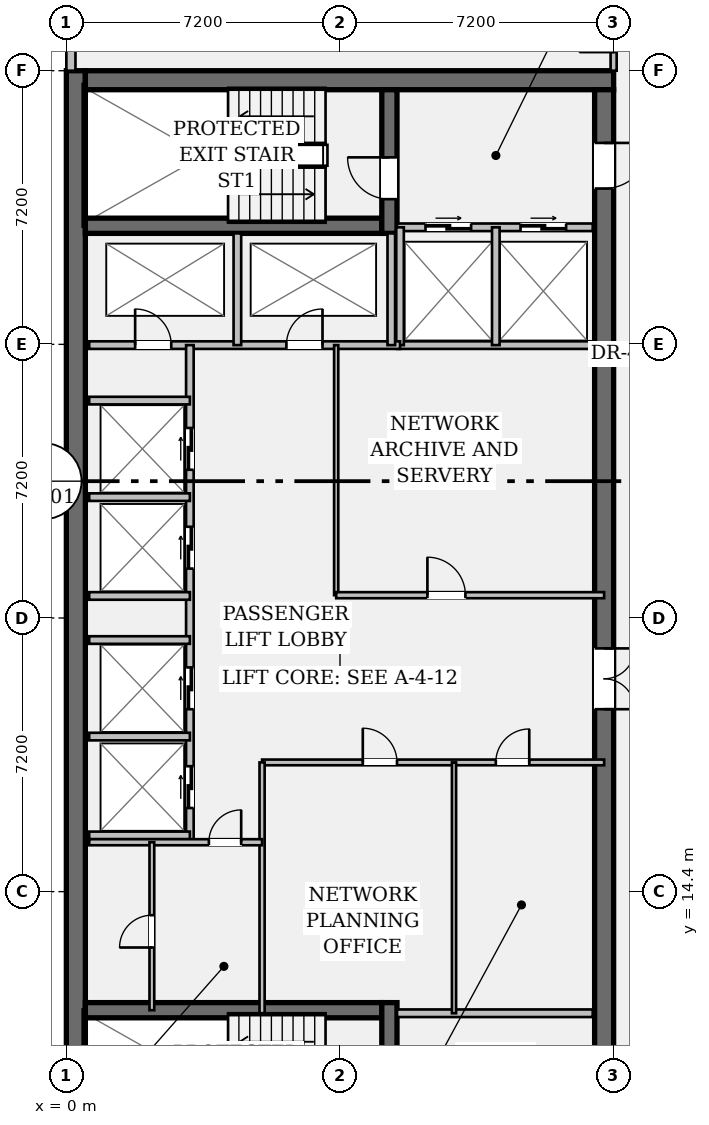
"""IFC4 building model, lengths in metres.
Left out: names, types, materials, properties, quantities, classifications, styles, units other than length and angle.
Written with IfcOpenShell. Run it as: python <this file> out.ifc"""

import sys

from ifc_helpers import new_model, si_unit, direction, frame, frame_2d, origin, place, context, subcontext, project, spatial, rectangle, extrude, element, fill, save


model = new_model("IFC4")
c1 = context("Model", 3, precision=1e-05, world=origin(), true_north=direction((0.0, 1.0)))
c2 = subcontext(c1, "Body", "Model", "MODEL_VIEW")
j1 = project(units=[si_unit("LENGTHUNIT", "METRE"), si_unit("PLANEANGLEUNIT", "RADIAN")], contexts=[c1])
p1 = place(None, origin())
s1 = spatial("IfcSite", under=j1, at=p1, CompositionType="ELEMENT")
p2 = place(p1, origin())
s2 = spatial("IfcBuilding", under=s1, at=p2, CompositionType="ELEMENT")
p3 = place(p2, frame((0.0, 0.0, 183.75)))
s3 = spatial("IfcBuildingStorey", under=s2, at=p3, CompositionType="ELEMENT", Elevation=183.75)
p4 = place(p3, frame((0.25, 7.2, 0.0), z_axis=(0.0, 0.0, 1.0), x_axis=(0.0, 1.0, 0.0)))
e1 = element("IfcWall", 1, at=p4, inside=s3, PredefinedType="SHEAR", context=c2, shape_type="SweptSolid", body=[
    extrude(rectangle(XDim=28.8, YDim=0.5, at=frame_2d((14.4, 0.0))), origin(), (0.0, 0.0, 1.0), 3.24),
])
p5 = place(p3, frame((0.5, 35.75, 0.0), z_axis=(0.0, 0.0, 1.0), x_axis=(1.0, 0.0, 0.0)))
e2 = element("IfcWall", 2, at=p5, inside=s3, PredefinedType="SHEAR", context=c2, shape_type="SweptSolid", body=[
    extrude(rectangle(XDim=13.9, YDim=0.5, at=frame_2d((6.95, 0.0))), origin(), (0.0, 0.0, 1.0), 3.24),
])
p6 = place(p3, frame((14.15, 35.5, 0.0), z_axis=(0.0, 0.0, 1.0), x_axis=(0.0, -1.0, 0.0)))
e3 = element("IfcWall", 3, at=p6, inside=s3, PredefinedType="SHEAR", context=c2, shape_type="SweptSolid", body=[
    extrude(rectangle(XDim=27.8, YDim=0.5, at=frame_2d((13.9, 0.0))), origin(), (0.0, 0.0, 1.0), 3.24),
])
p7 = place(p6, frame((1.4, 0.0, 0.0)))
e4 = element("IfcOpeningElement", 4, at=p7, cuts=e3, PredefinedType="OPENING", context=c2, shape_type="SweptSolid", body=[
    extrude(rectangle(XDim=1.2, YDim=2.15, at=frame_2d((0.6, 1.075))), frame((0.0, 0.262, 0.0), z_axis=(0.0, -1.0, 0.0), x_axis=(1.0, 0.0, 0.0)), (0.0, 0.0, 1.0), 0.524),
])
p8 = place(p6, frame((25.35, 0.0, 0.0)))
e5 = element("IfcOpeningElement", 5, at=p8, cuts=e3, PredefinedType="OPENING", context=c2, shape_type="SweptSolid", body=[
    extrude(rectangle(XDim=1.2, YDim=2.15, at=frame_2d((0.6, 1.075))), frame((0.0, 0.262, 0.0), z_axis=(0.0, -1.0, 0.0), x_axis=(1.0, 0.0, 0.0)), (0.0, 0.0, 1.0), 0.524),
])
p9 = place(p6, frame((14.7, 0.0, 0.0)))
e6 = element("IfcOpeningElement", 6, at=p9, cuts=e3, PredefinedType="OPENING", context=c2, shape_type="SweptSolid", body=[
    extrude(rectangle(XDim=1.6, YDim=2.2, at=frame_2d((0.8, 1.1))), frame((0.0, 0.262, 0.0), z_axis=(0.0, -1.0, 0.0), x_axis=(1.0, 0.0, 0.0)), (0.0, 0.0, 1.0), 0.524),
])
for number, where, z_axis, x_axis in (
    (7, (0.5, 31.92, 0.0), (0.0, 0.0, 1.0), (1.0, 0.0, 0.0)),
    (8, (0.5, 11.28, 0.0), (0.0, 0.0, 1.0), (1.0, 0.0, 0.0)),
):
    element("IfcWall", number, at=place(p3, frame(where, z_axis=z_axis, x_axis=x_axis)), inside=s3, PredefinedType="SHEAR", context=c2, shape_type="SweptSolid", body=[
        extrude(rectangle(XDim=7.8, YDim=0.4, at=frame_2d((3.9, 0.0))), origin(), (0.0, 0.0, 1.0), 3.24),
    ])
p10 = place(p3, frame((8.5, 31.72, 0.0), z_axis=(0.0, 0.0, 1.0), x_axis=(0.0, 1.0, 0.0)))
e9 = element("IfcWall", 9, at=p10, inside=s3, PredefinedType="SHEAR", context=c2, shape_type="SweptSolid", body=[
    extrude(rectangle(XDim=3.78, YDim=0.4, at=frame_2d((1.89, 0.0))), origin(), (0.0, 0.0, 1.0), 3.24),
])
p11 = place(p10, frame((0.9, 0.0, 0.0)))
e10 = element("IfcOpeningElement", 10, at=p11, cuts=e9, PredefinedType="OPENING", context=c2, shape_type="SweptSolid", body=[
    extrude(rectangle(XDim=1.1, YDim=2.15, at=frame_2d((0.55, 1.075))), frame((0.0, 0.212, 0.0), z_axis=(0.0, -1.0, 0.0), x_axis=(1.0, 0.0, 0.0)), (0.0, 0.0, 1.0), 0.424),
])
p12 = place(p3, frame((8.5, 7.7, 0.0), z_axis=(0.0, 0.0, 1.0), x_axis=(0.0, 1.0, 0.0)))
e11 = element("IfcWall", 11, at=p12, inside=s3, PredefinedType="SHEAR", context=c2, shape_type="SweptSolid", body=[
    extrude(rectangle(XDim=3.78, YDim=0.4, at=frame_2d((1.89, 0.0))), origin(), (0.0, 0.0, 1.0), 3.24),
])
p13 = place(p12, frame((0.85, 0.0, 0.0)))
e12 = element("IfcOpeningElement", 12, at=p13, cuts=e11, PredefinedType="OPENING", context=c2, shape_type="SweptSolid", body=[
    extrude(rectangle(XDim=1.1, YDim=2.15, at=frame_2d((0.55, 1.075))), frame((0.0, 0.212, 0.0), z_axis=(0.0, -1.0, 0.0), x_axis=(1.0, 0.0, 0.0)), (0.0, 0.0, 1.0), 0.424),
])
p14 = place(p3, frame((0.12, 36.0, 0.0), z_axis=(0.0, 0.0, 1.0), x_axis=(0.0, 1.0, 0.0)))
e13 = element("IfcWall", 13, at=p14, inside=s3, PredefinedType="STANDARD", context=c2, shape_type="SweptSolid", body=[
    extrude(rectangle(XDim=1.13, YDim=0.24, at=frame_2d((0.565, 0.0))), origin(), (0.0, 0.0, 1.0), 3.24),
])
p15 = place(p3, frame((8.7, 31.88, 0.0), z_axis=(0.0, 0.0, 1.0), x_axis=(1.0, 0.0, 0.0)))
e14 = element("IfcWall", 14, at=p15, inside=s3, PredefinedType="PARTITIONING", context=c2, shape_type="SweptSolid", body=[
    extrude(rectangle(XDim=5.15, YDim=0.2, at=frame_2d((2.575, 0.0))), origin(), (0.0, 0.0, 1.0), 3.24),
])
p16 = place(p15, frame((0.75, 0.0, 0.0)))
e15 = element("IfcOpeningElement", 15, at=p16, cuts=e14, PredefinedType="OPENING", context=c2, shape_type="SweptSolid", body=[
    extrude(rectangle(XDim=1.2, YDim=2.2, at=frame_2d((0.6, 1.1))), frame((0.0, 0.112, 0.0), z_axis=(0.0, -1.0, 0.0), x_axis=(1.0, 0.0, 0.0)), (0.0, 0.0, 1.0), 0.224),
])
p17 = place(p15, frame((3.25, 0.0, 0.0)))
e16 = element("IfcOpeningElement", 16, at=p17, cuts=e14, PredefinedType="OPENING", context=c2, shape_type="SweptSolid", body=[
    extrude(rectangle(XDim=1.2, YDim=2.2, at=frame_2d((0.6, 1.1))), frame((0.0, 0.112, 0.0), z_axis=(0.0, -1.0, 0.0), x_axis=(1.0, 0.0, 0.0)), (0.0, 0.0, 1.0), 0.224),
])
for number, where, z_axis, x_axis in (
    (17, (8.7, 11.2, 0.0), (0.0, 0.0, 1.0), (1.0, 0.0, 0.0)),
    (18, (8.7, 28.78, 0.0), (0.0, 0.0, 1.0), (1.0, 0.0, 0.0)),
):
    element("IfcWall", number, at=place(p3, frame(where, z_axis=z_axis, x_axis=x_axis)), inside=s3, PredefinedType="PARTITIONING", context=c2, shape_type="SweptSolid", body=[
        extrude(rectangle(XDim=5.15, YDim=0.2, at=frame_2d((2.575, 0.0))), origin(), (0.0, 0.0, 1.0), 3.24),
    ])
for number, where, z_axis, x_axis in (
    (19, (8.78, 28.78, 0.0), (0.0, 0.0, 1.0), (0.0, 1.0, 0.0)),
    (20, (11.3, 28.78, 0.0), (0.0, 0.0, 1.0), (0.0, 1.0, 0.0)),
):
    element("IfcWall", number, at=place(p3, frame(where, z_axis=z_axis, x_axis=x_axis)), inside=s3, PredefinedType="PARTITIONING", context=c2, shape_type="SweptSolid", body=[
        extrude(rectangle(XDim=3.1, YDim=0.2, at=frame_2d((1.55, 0.0))), origin(), (0.0, 0.0, 1.0), 3.24),
    ])
p18 = place(p3, frame((0.6, 28.78, 0.0), z_axis=(0.0, 0.0, 1.0), x_axis=(1.0, 0.0, 0.0)))
e21 = element("IfcWall", 21, at=p18, inside=s3, PredefinedType="PARTITIONING", context=c2, shape_type="SweptSolid", body=[
    extrude(rectangle(XDim=8.18, YDim=0.2, at=frame_2d((4.09, 0.0))), origin(), (0.0, 0.0, 1.0), 3.24),
])
p19 = place(p18, frame((1.21, 0.0, 0.0)))
e22 = element("IfcOpeningElement", 22, at=p19, cuts=e21, PredefinedType="OPENING", context=c2, shape_type="SweptSolid", body=[
    extrude(rectangle(XDim=0.95, YDim=2.15, at=frame_2d((0.475, 1.075))), frame((0.0, 0.112, 0.0), z_axis=(0.0, -1.0, 0.0), x_axis=(1.0, 0.0, 0.0)), (0.0, 0.0, 1.0), 0.224),
])
p20 = place(p18, frame((5.19, 0.0, 0.0)))
e23 = element("IfcOpeningElement", 23, at=p20, cuts=e21, PredefinedType="OPENING", context=c2, shape_type="SweptSolid", body=[
    extrude(rectangle(XDim=0.95, YDim=2.15, at=frame_2d((0.475, 1.075))), frame((0.0, 0.112, 0.0), z_axis=(0.0, -1.0, 0.0), x_axis=(1.0, 0.0, 0.0)), (0.0, 0.0, 1.0), 0.224),
])
for number, where, z_axis, x_axis in (
    (24, (4.5, 28.78, 0.0), (0.0, 0.0, 1.0), (0.0, 1.0, 0.0)),
    (25, (8.55, 28.78, 0.0), (0.0, 0.0, 1.0), (0.0, 1.0, 0.0)),
):
    element("IfcWall", number, at=place(p3, frame(where, z_axis=z_axis, x_axis=x_axis)), inside=s3, PredefinedType="PARTITIONING", context=c2, shape_type="SweptSolid", body=[
        extrude(rectangle(XDim=2.94, YDim=0.2, at=frame_2d((1.47, 0.0))), origin(), (0.0, 0.0, 1.0), 3.24),
    ])
p21 = place(p3, frame((3.25, 15.7, 0.0), z_axis=(0.0, 0.0, 1.0), x_axis=(0.0, 1.0, 0.0)))
e26 = element("IfcWall", 26, at=p21, inside=s3, PredefinedType="PARTITIONING", context=c2, shape_type="SweptSolid", body=[
    extrude(rectangle(XDim=13.08, YDim=0.2, at=frame_2d((6.54, 0.0))), origin(), (0.0, 0.0, 1.0), 3.24),
])
p22 = place(p21, frame((0.9, 0.0, 0.0)))
e27 = element("IfcOpeningElement", 27, at=p22, cuts=e26, PredefinedType="OPENING", context=c2, shape_type="SweptSolid", body=[
    extrude(rectangle(XDim=1.1, YDim=2.2, at=frame_2d((0.55, 1.1))), frame((0.0, 0.112, 0.0), z_axis=(0.0, -1.0, 0.0), x_axis=(1.0, 0.0, 0.0)), (0.0, 0.0, 1.0), 0.224),
])
p23 = place(p21, frame((3.5, 0.0, 0.0)))
e28 = element("IfcOpeningElement", 28, at=p23, cuts=e26, PredefinedType="OPENING", context=c2, shape_type="SweptSolid", body=[
    extrude(rectangle(XDim=1.1, YDim=2.2, at=frame_2d((0.55, 1.1))), frame((0.0, 0.112, 0.0), z_axis=(0.0, -1.0, 0.0), x_axis=(1.0, 0.0, 0.0)), (0.0, 0.0, 1.0), 0.224),
])
p24 = place(p21, frame((7.2, 0.0, 0.0)))
e29 = element("IfcOpeningElement", 29, at=p24, cuts=e26, PredefinedType="OPENING", context=c2, shape_type="SweptSolid", body=[
    extrude(rectangle(XDim=1.1, YDim=2.2, at=frame_2d((0.55, 1.1))), frame((0.0, 0.112, 0.0), z_axis=(0.0, -1.0, 0.0), x_axis=(1.0, 0.0, 0.0)), (0.0, 0.0, 1.0), 0.224),
])
p25 = place(p21, frame((9.8, 0.0, 0.0)))
e30 = element("IfcOpeningElement", 30, at=p25, cuts=e26, PredefinedType="OPENING", context=c2, shape_type="SweptSolid", body=[
    extrude(rectangle(XDim=1.1, YDim=2.2, at=frame_2d((0.55, 1.1))), frame((0.0, 0.112, 0.0), z_axis=(0.0, -1.0, 0.0), x_axis=(1.0, 0.0, 0.0)), (0.0, 0.0, 1.0), 0.224),
])
for number, where, z_axis, x_axis in (
    (31, (0.6, 15.88, 0.0), (0.0, 0.0, 1.0), (1.0, 0.0, 0.0)),
    (32, (0.6, 18.48, 0.0), (0.0, 0.0, 1.0), (1.0, 0.0, 0.0)),
    (33, (0.6, 22.18, 0.0), (0.0, 0.0, 1.0), (1.0, 0.0, 0.0)),
    (34, (0.6, 24.78, 0.0), (0.0, 0.0, 1.0), (1.0, 0.0, 0.0)),
    (35, (0.6, 21.02, 0.0), (0.0, 0.0, 1.0), (1.0, 0.0, 0.0)),
    (36, (0.6, 27.32, 0.0), (0.0, 0.0, 1.0), (1.0, 0.0, 0.0)),
):
    element("IfcWall", number, at=place(p3, frame(where, z_axis=z_axis, x_axis=x_axis)), inside=s3, PredefinedType="PARTITIONING", context=c2, shape_type="SweptSolid", body=[
        extrude(rectangle(XDim=2.65, YDim=0.2, at=frame_2d((1.325, 0.0))), origin(), (0.0, 0.0, 1.0), 3.24),
    ])
p26 = place(p3, frame((7.1, 22.2, 0.0), z_axis=(0.0, 0.0, 1.0), x_axis=(0.0, 1.0, 0.0)))
e37 = element("IfcWall", 37, at=p26, inside=s3, PredefinedType="PARTITIONING", context=c2, shape_type="SweptSolid", body=[
    extrude(rectangle(XDim=6.58, YDim=0.11, at=frame_2d((3.29, 0.0))), origin(), (0.0, 0.0, 1.0), 3.24),
])
p27 = place(p3, frame((7.1, 22.2, 0.0), z_axis=(0.0, 0.0, 1.0), x_axis=(1.0, 0.0, 0.0)))
e38 = element("IfcWall", 38, at=p27, inside=s3, PredefinedType="PARTITIONING", context=c2, shape_type="SweptSolid", body=[
    extrude(rectangle(XDim=7.05, YDim=0.16, at=frame_2d((3.525, 0.0))), origin(), (0.0, 0.0, 1.0), 3.24),
])
p28 = place(p27, frame((2.4, 0.0, 0.0)))
e39 = element("IfcOpeningElement", 39, at=p28, cuts=e38, PredefinedType="OPENING", context=c2, shape_type="SweptSolid", body=[
    extrude(rectangle(XDim=1.0, YDim=2.15, at=frame_2d((0.5, 1.075))), frame((0.0, 0.092, 0.0), z_axis=(0.0, -1.0, 0.0), x_axis=(1.0, 0.0, 0.0)), (0.0, 0.0, 1.0), 0.184),
])
p29 = place(p3, frame((5.15, 17.8, 0.0), z_axis=(0.0, 0.0, 1.0), x_axis=(1.0, 0.0, 0.0)))
e40 = element("IfcWall", 40, at=p29, inside=s3, PredefinedType="PARTITIONING", context=c2, shape_type="SweptSolid", body=[
    extrude(rectangle(XDim=9.0, YDim=0.15, at=frame_2d((4.5, 0.0))), origin(), (0.0, 0.0, 1.0), 3.24),
])
p30 = place(p29, frame((2.65, 0.0, 0.0)))
e41 = element("IfcOpeningElement", 41, at=p30, cuts=e40, PredefinedType="OPENING", context=c2, shape_type="SweptSolid", body=[
    extrude(rectangle(XDim=0.9, YDim=2.15, at=frame_2d((0.45, 1.075))), frame((0.0, 0.087, 0.0), z_axis=(0.0, -1.0, 0.0), x_axis=(1.0, 0.0, 0.0)), (0.0, 0.0, 1.0), 0.174),
])
p31 = place(p29, frame((6.15, 0.0, 0.0)))
e42 = element("IfcOpeningElement", 42, at=p31, cuts=e40, PredefinedType="OPENING", context=c2, shape_type="SweptSolid", body=[
    extrude(rectangle(XDim=0.88, YDim=2.15, at=frame_2d((0.44, 1.075))), frame((0.0, 0.087, 0.0), z_axis=(0.0, -1.0, 0.0), x_axis=(1.0, 0.0, 0.0)), (0.0, 0.0, 1.0), 0.174),
])
p32 = place(p3, frame((5.15, 11.2, 0.0), z_axis=(0.0, 0.0, 1.0), x_axis=(0.0, 1.0, 0.0)))
e43 = element("IfcWall", 43, at=p32, inside=s3, PredefinedType="PARTITIONING", context=c2, shape_type="SweptSolid", body=[
    extrude(rectangle(XDim=6.6, YDim=0.135, at=frame_2d((3.3, 0.0))), origin(), (0.0, 0.0, 1.0), 3.24),
])
p33 = place(p3, frame((10.2, 11.2, 0.0), z_axis=(0.0, 0.0, 1.0), x_axis=(0.0, 1.0, 0.0)))
e44 = element("IfcWall", 44, at=p33, inside=s3, PredefinedType="PARTITIONING", context=c2, shape_type="SweptSolid", body=[
    extrude(rectangle(XDim=6.6, YDim=0.11, at=frame_2d((3.3, 0.0))), origin(), (0.0, 0.0, 1.0), 3.24),
])
p34 = place(p3, frame((0.6, 15.7, 0.0), z_axis=(0.0, 0.0, 1.0), x_axis=(1.0, 0.0, 0.0)))
e45 = element("IfcWall", 45, at=p34, inside=s3, PredefinedType="PARTITIONING", context=c2, shape_type="SweptSolid", body=[
    extrude(rectangle(XDim=4.55, YDim=0.16, at=frame_2d((2.275, 0.0))), origin(), (0.0, 0.0, 1.0), 3.24),
])
p35 = place(p34, frame((3.15, 0.0, 0.0)))
e46 = element("IfcOpeningElement", 46, at=p35, cuts=e45, PredefinedType="OPENING", context=c2, shape_type="SweptSolid", body=[
    extrude(rectangle(XDim=0.85, YDim=2.15, at=frame_2d((0.425, 1.075))), frame((0.0, 0.092, 0.0), z_axis=(0.0, -1.0, 0.0), x_axis=(1.0, 0.0, 0.0)), (0.0, 0.0, 1.0), 0.184),
])
p36 = place(p3, frame((2.25, 11.28, 0.0), z_axis=(0.0, 0.0, 1.0), x_axis=(0.0, 1.0, 0.0)))
e47 = element("IfcWall", 47, at=p36, inside=s3, PredefinedType="PARTITIONING", context=c2, shape_type="SweptSolid", body=[
    extrude(rectangle(XDim=4.42, YDim=0.125, at=frame_2d((2.21, 0.0))), origin(), (0.0, 0.0, 1.0), 3.24),
])
p37 = place(p36, frame((1.65, 0.0, 0.0)))
e48 = element("IfcOpeningElement", 48, at=p37, cuts=e47, PredefinedType="OPENING", context=c2, shape_type="SweptSolid", body=[
    extrude(rectangle(XDim=0.85, YDim=2.15, at=frame_2d((0.425, 1.075))), frame((0.0, 0.074, 0.0), z_axis=(0.0, -1.0, 0.0), x_axis=(1.0, 0.0, 0.0)), (0.0, 0.0, 1.0), 0.149),
])
p38 = place(p3, frame((14.4, 36.0, 0.0), z_axis=(0.0, 0.0, 1.0), x_axis=(0.0, 1.0, 0.0)))
e49 = element("IfcWall", 49, at=p38, inside=s3, PredefinedType="PARTITIONING", context=c2, shape_type="SweptSolid", body=[
    extrude(rectangle(XDim=3.88, YDim=0.16, at=frame_2d((1.94, 0.0))), origin(), (0.0, 0.0, 1.0), 2.603),
])
p39 = place(p38, frame((0.49, 0.0, 0.0)))
e50 = element("IfcOpeningElement", 50, at=p39, cuts=e49, PredefinedType="OPENING", context=c2, shape_type="SweptSolid", body=[
    extrude(rectangle(XDim=0.9, YDim=2.15, at=frame_2d((0.45, 1.075))), frame((0.0, 0.092, 0.0), z_axis=(0.0, -1.0, 0.0), x_axis=(1.0, 0.0, 0.0)), (0.0, 0.0, 1.0), 0.184),
])
p40 = place(p11, origin())
e51 = element("IfcDoor", 51, at=p40, inside=s3, OperationType="SINGLE_SWING_RIGHT", PredefinedType="DOOR", context=c2, shape_type="SweptSolid", body=[
    extrude(rectangle(XDim=1.1, YDim=2.15, at=frame_2d((0.55, 1.075))), frame((0.0, 0.025, 0.0), z_axis=(0.0, -1.0, 0.0), x_axis=(1.0, 0.0, 0.0)), (0.0, 0.0, 1.0), 0.05),
])
fill(e10, e51)
p41 = place(p7, origin())
e52 = element("IfcDoor", 52, at=p41, inside=s3, OperationType="SINGLE_SWING_LEFT", PredefinedType="DOOR", context=c2, shape_type="SweptSolid", body=[
    extrude(rectangle(XDim=1.2, YDim=2.15, at=frame_2d((0.6, 1.075))), frame((0.0, 0.025, 0.0), z_axis=(0.0, -1.0, 0.0), x_axis=(1.0, 0.0, 0.0)), (0.0, 0.0, 1.0), 0.05),
])
fill(e4, e52)
p42 = place(p16, origin())
e53 = element("IfcDoor", 53, at=p42, inside=s3, OperationType="DOUBLE_DOOR_SLIDING", PredefinedType="DOOR", context=c2, shape_type="SweptSolid", body=[
    extrude(rectangle(XDim=1.2, YDim=2.2, at=frame_2d((0.6, 1.1))), frame((0.0, 0.025, 0.0), z_axis=(0.0, -1.0, 0.0), x_axis=(1.0, 0.0, 0.0)), (0.0, 0.0, 1.0), 0.05),
])
fill(e15, e53)
p43 = place(p17, origin())
e54 = element("IfcDoor", 54, at=p43, inside=s3, OperationType="DOUBLE_DOOR_SLIDING", PredefinedType="DOOR", context=c2, shape_type="SweptSolid", body=[
    extrude(rectangle(XDim=1.2, YDim=2.2, at=frame_2d((0.6, 1.1))), frame((0.0, 0.025, 0.0), z_axis=(0.0, -1.0, 0.0), x_axis=(1.0, 0.0, 0.0)), (0.0, 0.0, 1.0), 0.05),
])
fill(e16, e54)
p44 = place(p19, origin())
e55 = element("IfcDoor", 55, at=p44, inside=s3, OperationType="SINGLE_SWING_LEFT", PredefinedType="DOOR", context=c2, shape_type="SweptSolid", body=[
    extrude(rectangle(XDim=0.95, YDim=2.15, at=frame_2d((0.475, 1.075))), frame((0.0, 0.025, 0.0), z_axis=(0.0, -1.0, 0.0), x_axis=(1.0, 0.0, 0.0)), (0.0, 0.0, 1.0), 0.05),
])
fill(e22, e55)
p45 = place(p20, origin())
e56 = element("IfcDoor", 56, at=p45, inside=s3, OperationType="SINGLE_SWING_RIGHT", PredefinedType="DOOR", context=c2, shape_type="SweptSolid", body=[
    extrude(rectangle(XDim=0.95, YDim=2.15, at=frame_2d((0.475, 1.075))), frame((0.0, 0.025, 0.0), z_axis=(0.0, -1.0, 0.0), x_axis=(1.0, 0.0, 0.0)), (0.0, 0.0, 1.0), 0.05),
])
fill(e23, e56)
p46 = place(p9, origin())
e57 = element("IfcDoor", 57, at=p46, inside=s3, OperationType="DOUBLE_DOOR_SINGLE_SWING", PredefinedType="DOOR", context=c2, shape_type="SweptSolid", body=[
    extrude(rectangle(XDim=1.6, YDim=2.2, at=frame_2d((0.8, 1.1))), frame((0.0, 0.025, 0.0), z_axis=(0.0, -1.0, 0.0), x_axis=(1.0, 0.0, 0.0)), (0.0, 0.0, 1.0), 0.05),
])
fill(e6, e57)
p47 = place(p22, origin())
e58 = element("IfcDoor", 58, at=p47, inside=s3, OperationType="DOUBLE_DOOR_SLIDING", PredefinedType="DOOR", context=c2, shape_type="SweptSolid", body=[
    extrude(rectangle(XDim=1.1, YDim=2.2, at=frame_2d((0.55, 1.1))), frame((0.0, 0.025, 0.0), z_axis=(0.0, -1.0, 0.0), x_axis=(1.0, 0.0, 0.0)), (0.0, 0.0, 1.0), 0.05),
])
fill(e27, e58)
p48 = place(p23, origin())
e59 = element("IfcDoor", 59, at=p48, inside=s3, OperationType="DOUBLE_DOOR_SLIDING", PredefinedType="DOOR", context=c2, shape_type="SweptSolid", body=[
    extrude(rectangle(XDim=1.1, YDim=2.2, at=frame_2d((0.55, 1.1))), frame((0.0, 0.025, 0.0), z_axis=(0.0, -1.0, 0.0), x_axis=(1.0, 0.0, 0.0)), (0.0, 0.0, 1.0), 0.05),
])
fill(e28, e59)
p49 = place(p24, origin())
e60 = element("IfcDoor", 60, at=p49, inside=s3, OperationType="DOUBLE_DOOR_SLIDING", PredefinedType="DOOR", context=c2, shape_type="SweptSolid", body=[
    extrude(rectangle(XDim=1.1, YDim=2.2, at=frame_2d((0.55, 1.1))), frame((0.0, 0.025, 0.0), z_axis=(0.0, -1.0, 0.0), x_axis=(1.0, 0.0, 0.0)), (0.0, 0.0, 1.0), 0.05),
])
fill(e29, e60)
p50 = place(p25, origin())
e61 = element("IfcDoor", 61, at=p50, inside=s3, OperationType="DOUBLE_DOOR_SLIDING", PredefinedType="DOOR", context=c2, shape_type="SweptSolid", body=[
    extrude(rectangle(XDim=1.1, YDim=2.2, at=frame_2d((0.55, 1.1))), frame((0.0, 0.025, 0.0), z_axis=(0.0, -1.0, 0.0), x_axis=(1.0, 0.0, 0.0)), (0.0, 0.0, 1.0), 0.05),
])
fill(e30, e61)
p51 = place(p28, origin())
e62 = element("IfcDoor", 62, at=p51, inside=s3, OperationType="SINGLE_SWING_LEFT", PredefinedType="DOOR", context=c2, shape_type="SweptSolid", body=[
    extrude(rectangle(XDim=1.0, YDim=2.15, at=frame_2d((0.5, 1.075))), frame((0.0, 0.025, 0.0), z_axis=(0.0, -1.0, 0.0), x_axis=(1.0, 0.0, 0.0)), (0.0, 0.0, 1.0), 0.05),
])
fill(e39, e62)
p52 = place(p30, origin())
e63 = element("IfcDoor", 63, at=p52, inside=s3, OperationType="SINGLE_SWING_LEFT", PredefinedType="DOOR", context=c2, shape_type="SweptSolid", body=[
    extrude(rectangle(XDim=0.9, YDim=2.15, at=frame_2d((0.45, 1.075))), frame((0.0, 0.025, 0.0), z_axis=(0.0, -1.0, 0.0), x_axis=(1.0, 0.0, 0.0)), (0.0, 0.0, 1.0), 0.05),
])
fill(e41, e63)
p53 = place(p31, origin())
e64 = element("IfcDoor", 64, at=p53, inside=s3, OperationType="SINGLE_SWING_RIGHT", PredefinedType="DOOR", context=c2, shape_type="SweptSolid", body=[
    extrude(rectangle(XDim=0.88, YDim=2.15, at=frame_2d((0.44, 1.075))), frame((0.0, 0.025, 0.0), z_axis=(0.0, -1.0, 0.0), x_axis=(1.0, 0.0, 0.0)), (0.0, 0.0, 1.0), 0.05),
])
fill(e42, e64)
p54 = place(p35, origin())
e65 = element("IfcDoor", 65, at=p54, inside=s3, OperationType="SINGLE_SWING_RIGHT", PredefinedType="DOOR", context=c2, shape_type="SweptSolid", body=[
    extrude(rectangle(XDim=0.85, YDim=2.15, at=frame_2d((0.425, 1.075))), frame((0.0, 0.025, 0.0), z_axis=(0.0, -1.0, 0.0), x_axis=(1.0, 0.0, 0.0)), (0.0, 0.0, 1.0), 0.05),
])
fill(e46, e65)
p55 = place(p37, origin())
e66 = element("IfcDoor", 66, at=p55, inside=s3, OperationType="SINGLE_SWING_LEFT", PredefinedType="DOOR", context=c2, shape_type="SweptSolid", body=[
    extrude(rectangle(XDim=0.85, YDim=2.15, at=frame_2d((0.425, 1.075))), frame((0.0, 0.025, 0.0), z_axis=(0.0, -1.0, 0.0), x_axis=(1.0, 0.0, 0.0)), (0.0, 0.0, 1.0), 0.05),
])
fill(e48, e66)
save(model, sys.argv[1])
